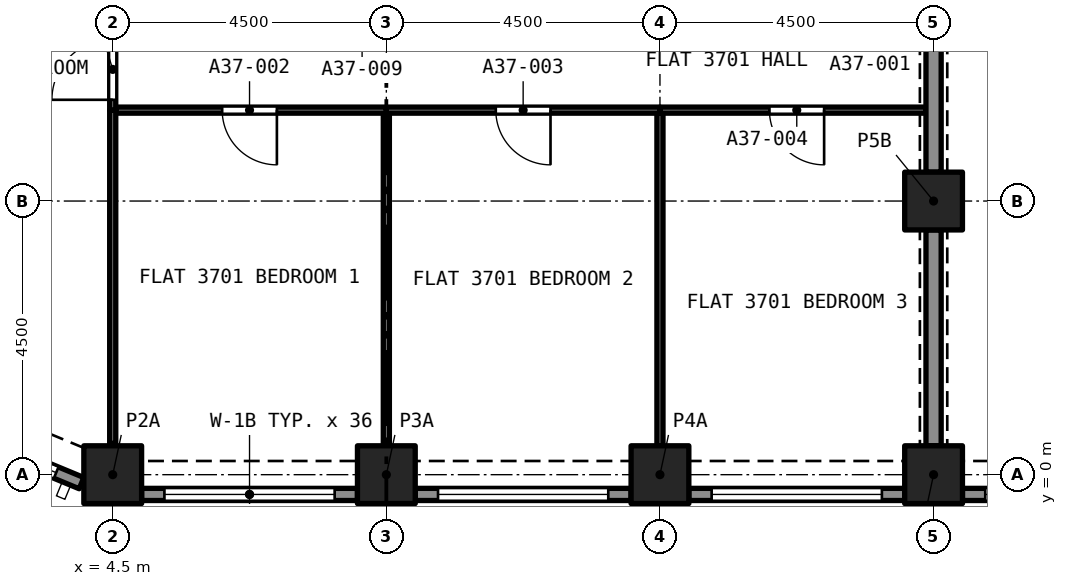
"""IFC4 building model, lengths in metres.
Left out: names, types, materials, properties, quantities, classifications, styles, units other than length and angle.
Written with IfcOpenShell. Run it as: python <this file> out.ifc"""

import sys

from ifc_helpers import new_model, si_unit, direction, frame, frame_2d, origin, origin_2d, place, context, subcontext, project, spatial, rectangle, extrude, element, fill, save


model = new_model("IFC4")
c1 = context("Model", 3, precision=1e-05, world=origin(), true_north=direction((0.0, 1.0)))
c2 = subcontext(c1, "Body", "Model", "MODEL_VIEW")
j1 = project(units=[si_unit("LENGTHUNIT", "METRE"), si_unit("PLANEANGLEUNIT", "RADIAN")], contexts=[c1])
p1 = place(None, origin())
s1 = spatial("IfcSite", under=j1, at=p1, CompositionType="ELEMENT")
p2 = place(p1, origin())
s2 = spatial("IfcBuilding", under=s1, at=p2, CompositionType="ELEMENT")
p3 = place(p2, frame((0.0, 0.0, 133.4)))
s3 = spatial("IfcBuildingStorey", under=s2, at=p3, CompositionType="ELEMENT", Elevation=133.4)
for number, where, z_axis, x_axis in (
    (1, (4.5, 0.0, 0.0), (0.0, 0.0, 1.0), (1.0, 0.0, 0.0)),
    (2, (9.0, 0.0, 0.0), (0.0, 0.0, 1.0), (1.0, 0.0, 0.0)),
    (3, (13.5, 0.0, 0.0), (0.0, 0.0, 1.0), (1.0, 0.0, 0.0)),
    (4, (18.0, 0.0, 0.0), (0.0, 0.0, 1.0), (1.0, 0.0, 0.0)),
    (5, (18.0, 4.5, 0.0), (0.0, 0.0, 1.0), (1.0, 0.0, 0.0)),
):
    element("IfcColumn", number, at=place(p3, frame(where, z_axis=z_axis, x_axis=x_axis)), inside=s3, PredefinedType="COLUMN", context=c2, shape_type="SweptSolid", body=[
        extrude(rectangle(XDim=0.95, YDim=0.95, at=origin_2d()), origin(), (0.0, 0.0, 1.0), 3.2),
    ])
p4 = place(p3, frame((3.987, -0.139, 0.0), z_axis=(0.0, 0.0, 1.0), x_axis=(-0.923880599843, 0.382680855588, 0.0)))
e6 = element("IfcWall", 6, at=p4, inside=s3, PredefinedType="SOLIDWALL", context=c2, shape_type="SweptSolid", body=[
    extrude(rectangle(XDim=2.403, YDim=0.2, at=frame_2d((1.201, 0.0))), origin(), (0.0, 0.0, 1.0), 3.2),
])
p5 = place(p4, frame((0.451, 0.0, 0.45)))
e7 = element("IfcOpeningElement", 7, at=p5, cuts=e6, PredefinedType="OPENING", context=c2, shape_type="SweptSolid", body=[
    extrude(rectangle(XDim=1.7, YDim=1.95, at=frame_2d((0.85, 0.975))), frame((0.0, 0.11, 0.0), z_axis=(0.0, -1.0, 0.0), x_axis=(1.0, 0.0, 0.0)), (0.0, 0.0, 1.0), 0.22),
])
p6 = place(p3, frame((8.525, -0.325, 0.0), z_axis=(0.0, 0.0, 1.0), x_axis=(-1.0, 0.0, 0.0)))
e8 = element("IfcWall", 8, at=p6, inside=s3, PredefinedType="SOLIDWALL", context=c2, shape_type="SweptSolid", body=[
    extrude(rectangle(XDim=3.55, YDim=0.2, at=frame_2d((1.775, 0.0))), origin(), (0.0, 0.0, 1.0), 3.2),
])
p7 = place(p6, frame((0.375, 0.0, 0.45)))
e9 = element("IfcOpeningElement", 9, at=p7, cuts=e8, PredefinedType="OPENING", context=c2, shape_type="SweptSolid", body=[
    extrude(rectangle(XDim=2.8, YDim=1.95, at=frame_2d((1.4, 0.975))), frame((0.0, 0.11, 0.0), z_axis=(0.0, -1.0, 0.0), x_axis=(1.0, 0.0, 0.0)), (0.0, 0.0, 1.0), 0.22),
])
p8 = place(p3, frame((13.025, -0.325, 0.0), z_axis=(0.0, 0.0, 1.0), x_axis=(-1.0, 0.0, 0.0)))
e10 = element("IfcWall", 10, at=p8, inside=s3, PredefinedType="SOLIDWALL", context=c2, shape_type="SweptSolid", body=[
    extrude(rectangle(XDim=3.55, YDim=0.2, at=frame_2d((1.775, 0.0))), origin(), (0.0, 0.0, 1.0), 3.2),
])
p9 = place(p8, frame((0.375, 0.0, 0.45)))
e11 = element("IfcOpeningElement", 11, at=p9, cuts=e10, PredefinedType="OPENING", context=c2, shape_type="SweptSolid", body=[
    extrude(rectangle(XDim=2.8, YDim=1.95, at=frame_2d((1.4, 0.975))), frame((0.0, 0.11, 0.0), z_axis=(0.0, -1.0, 0.0), x_axis=(1.0, 0.0, 0.0)), (0.0, 0.0, 1.0), 0.22),
])
p10 = place(p3, frame((17.525, -0.325, 0.0), z_axis=(0.0, 0.0, 1.0), x_axis=(-1.0, 0.0, 0.0)))
e12 = element("IfcWall", 12, at=p10, inside=s3, PredefinedType="SOLIDWALL", context=c2, shape_type="SweptSolid", body=[
    extrude(rectangle(XDim=3.55, YDim=0.2, at=frame_2d((1.775, 0.0))), origin(), (0.0, 0.0, 1.0), 3.2),
])
p11 = place(p10, frame((0.375, 0.0, 0.45)))
e13 = element("IfcOpeningElement", 13, at=p11, cuts=e12, PredefinedType="OPENING", context=c2, shape_type="SweptSolid", body=[
    extrude(rectangle(XDim=2.8, YDim=1.95, at=frame_2d((1.4, 0.975))), frame((0.0, 0.11, 0.0), z_axis=(0.0, -1.0, 0.0), x_axis=(1.0, 0.0, 0.0)), (0.0, 0.0, 1.0), 0.22),
])
p12 = place(p3, frame((22.025, -0.325, 0.0), z_axis=(0.0, 0.0, 1.0), x_axis=(-1.0, 0.0, 0.0)))
e14 = element("IfcWall", 14, at=p12, inside=s3, PredefinedType="SOLIDWALL", context=c2, shape_type="SweptSolid", body=[
    extrude(rectangle(XDim=3.55, YDim=0.2, at=frame_2d((1.775, 0.0))), origin(), (0.0, 0.0, 1.0), 3.2),
])
p13 = place(p12, frame((0.375, 0.0, 0.45)))
e15 = element("IfcOpeningElement", 15, at=p13, cuts=e14, PredefinedType="OPENING", context=c2, shape_type="SweptSolid", body=[
    extrude(rectangle(XDim=2.8, YDim=1.95, at=frame_2d((1.4, 0.975))), frame((0.0, 0.11, 0.0), z_axis=(0.0, -1.0, 0.0), x_axis=(1.0, 0.0, 0.0)), (0.0, 0.0, 1.0), 0.22),
])
p14 = place(p3, frame((9.0, 0.475, 0.0), z_axis=(0.0, 0.0, 1.0), x_axis=(0.0, 1.0, 0.0)))
e16 = element("IfcWall", 16, at=p14, inside=s3, PredefinedType="PARTITIONING", context=c2, shape_type="SweptSolid", body=[
    extrude(rectangle(XDim=5.47, YDim=0.1, at=frame_2d((2.735, 0.0))), origin(), (0.0, 0.0, 1.0), 2.9),
])
p15 = place(p3, frame((9.0, 5.995, 0.0), z_axis=(0.0, 0.0, 1.0), x_axis=(-1.0, 0.0, 0.0)))
e17 = element("IfcWall", 17, at=p15, inside=s3, PredefinedType="PARTITIONING", context=c2, shape_type="SweptSolid", body=[
    extrude(rectangle(XDim=4.45, YDim=0.1, at=frame_2d((2.225, 0.0))), origin(), (0.0, 0.0, 1.0), 2.9),
])
p16 = place(p15, frame((1.8, 0.0, 0.0)))
e18 = element("IfcOpeningElement", 18, at=p16, cuts=e17, PredefinedType="OPENING", context=c2, shape_type="SweptSolid", body=[
    extrude(rectangle(XDim=0.9, YDim=2.1, at=frame_2d((0.45, 1.05))), frame((0.0, 0.06, 0.0), z_axis=(0.0, -1.0, 0.0), x_axis=(1.0, 0.0, 0.0)), (0.0, 0.0, 1.0), 0.12),
])
p17 = place(p3, frame((4.5, 0.514, 0.0), z_axis=(0.0, 0.0, 1.0), x_axis=(0.0, 1.0, 0.0)))
e19 = element("IfcWall", 19, at=p17, inside=s3, PredefinedType="PARTITIONING", context=c2, shape_type="SweptSolid", body=[
    extrude(rectangle(XDim=5.481, YDim=0.1, at=frame_2d((2.74, 0.0))), origin(), (0.0, 0.0, 1.0), 2.9),
])
p18 = place(p3, frame((13.5, 0.475, 0.0), z_axis=(0.0, 0.0, 1.0), x_axis=(0.0, 1.0, 0.0)))
e20 = element("IfcWall", 20, at=p18, inside=s3, PredefinedType="PARTITIONING", context=c2, shape_type="SweptSolid", body=[
    extrude(rectangle(XDim=5.47, YDim=0.1, at=frame_2d((2.735, 0.0))), origin(), (0.0, 0.0, 1.0), 2.9),
])
p19 = place(p3, frame((13.5, 5.995, 0.0), z_axis=(0.0, 0.0, 1.0), x_axis=(-1.0, 0.0, 0.0)))
e21 = element("IfcWall", 21, at=p19, inside=s3, PredefinedType="PARTITIONING", context=c2, shape_type="SweptSolid", body=[
    extrude(rectangle(XDim=4.5, YDim=0.1, at=frame_2d((2.25, 0.0))), origin(), (0.0, 0.0, 1.0), 2.9),
])
p20 = place(p19, frame((1.8, 0.0, 0.0)))
e22 = element("IfcOpeningElement", 22, at=p20, cuts=e21, PredefinedType="OPENING", context=c2, shape_type="SweptSolid", body=[
    extrude(rectangle(XDim=0.9, YDim=2.1, at=frame_2d((0.45, 1.05))), frame((0.0, 0.06, 0.0), z_axis=(0.0, -1.0, 0.0), x_axis=(1.0, 0.0, 0.0)), (0.0, 0.0, 1.0), 0.12),
])
p21 = place(p3, frame((17.875, 5.995, 0.0), z_axis=(0.0, 0.0, 1.0), x_axis=(-1.0, 0.0, 0.0)))
e23 = element("IfcWall", 23, at=p21, inside=s3, PredefinedType="PARTITIONING", context=c2, shape_type="SweptSolid", body=[
    extrude(rectangle(XDim=4.375, YDim=0.1, at=frame_2d((2.188, 0.0))), origin(), (0.0, 0.0, 1.0), 2.9),
])
p22 = place(p21, frame((1.675, 0.0, 0.0)))
e24 = element("IfcOpeningElement", 24, at=p22, cuts=e23, PredefinedType="OPENING", context=c2, shape_type="SweptSolid", body=[
    extrude(rectangle(XDim=0.9, YDim=2.1, at=frame_2d((0.45, 1.05))), frame((0.0, 0.06, 0.0), z_axis=(0.0, -1.0, 0.0), x_axis=(1.0, 0.0, 0.0)), (0.0, 0.0, 1.0), 0.12),
])
for number, where, z_axis, x_axis in (
    (25, (18.0, 4.975, 0.0), (0.0, 0.0, 1.0), (0.0, 1.0, 0.0)),
    (26, (18.0, 0.475, 0.0), (0.0, 0.0, 1.0), (0.0, 1.0, 0.0)),
):
    element("IfcWall", number, at=place(p3, frame(where, z_axis=z_axis, x_axis=x_axis)), inside=s3, PredefinedType="PARTITIONING", context=c2, shape_type="SweptSolid", body=[
        extrude(rectangle(XDim=3.55, YDim=0.25, at=frame_2d((1.775, 0.0))), origin(), (0.0, 0.0, 1.0), 2.38),
    ])
p23 = place(p3, frame((4.5, 5.995, 0.0), z_axis=(0.0, 0.0, 1.0), x_axis=(0.0, 1.0, 0.0)))
e27 = element("IfcWall", 27, at=p23, inside=s3, PredefinedType="PARTITIONING", context=c2, shape_type="SweptSolid", body=[
    extrude(rectangle(XDim=1.34, YDim=0.1, at=frame_2d((0.67, 0.0))), origin(), (0.0, 0.0, 1.0), 2.9),
])
p24 = place(p23, frame((0.17, 0.0, 0.0)))
e28 = element("IfcOpeningElement", 28, at=p24, cuts=e27, PredefinedType="OPENING", context=c2, shape_type="SweptSolid", body=[
    extrude(rectangle(XDim=1.0, YDim=2.1, at=frame_2d((0.5, 1.05))), frame((0.0, 0.06, 0.0), z_axis=(0.0, -1.0, 0.0), x_axis=(1.0, 0.0, 0.0)), (0.0, 0.0, 1.0), 0.12),
])
p25 = place(p5, origin())
e29 = element("IfcWindow", 29, at=p25, inside=s3, PartitioningType="SINGLE_PANEL", PredefinedType="WINDOW", context=c2, shape_type="SweptSolid", body=[
    extrude(rectangle(XDim=1.7, YDim=1.95, at=frame_2d((0.85, 0.975))), frame((0.0, 0.03, 0.0), z_axis=(0.0, -1.0, 0.0), x_axis=(1.0, 0.0, 0.0)), (0.0, 0.0, 1.0), 0.06),
])
fill(e7, e29)
p26 = place(p7, origin())
e30 = element("IfcWindow", 30, at=p26, inside=s3, PartitioningType="SINGLE_PANEL", PredefinedType="WINDOW", context=c2, shape_type="SweptSolid", body=[
    extrude(rectangle(XDim=2.8, YDim=1.95, at=frame_2d((1.4, 0.975))), frame((0.0, 0.03, 0.0), z_axis=(0.0, -1.0, 0.0), x_axis=(1.0, 0.0, 0.0)), (0.0, 0.0, 1.0), 0.06),
])
fill(e9, e30)
p27 = place(p9, origin())
e31 = element("IfcWindow", 31, at=p27, inside=s3, PartitioningType="SINGLE_PANEL", PredefinedType="WINDOW", context=c2, shape_type="SweptSolid", body=[
    extrude(rectangle(XDim=2.8, YDim=1.95, at=frame_2d((1.4, 0.975))), frame((0.0, 0.03, 0.0), z_axis=(0.0, -1.0, 0.0), x_axis=(1.0, 0.0, 0.0)), (0.0, 0.0, 1.0), 0.06),
])
fill(e11, e31)
p28 = place(p11, origin())
e32 = element("IfcWindow", 32, at=p28, inside=s3, PartitioningType="SINGLE_PANEL", PredefinedType="WINDOW", context=c2, shape_type="SweptSolid", body=[
    extrude(rectangle(XDim=2.8, YDim=1.95, at=frame_2d((1.4, 0.975))), frame((0.0, 0.03, 0.0), z_axis=(0.0, -1.0, 0.0), x_axis=(1.0, 0.0, 0.0)), (0.0, 0.0, 1.0), 0.06),
])
fill(e13, e32)
p29 = place(p13, origin())
e33 = element("IfcWindow", 33, at=p29, inside=s3, PartitioningType="SINGLE_PANEL", PredefinedType="WINDOW", context=c2, shape_type="SweptSolid", body=[
    extrude(rectangle(XDim=2.8, YDim=1.95, at=frame_2d((1.4, 0.975))), frame((0.0, 0.03, 0.0), z_axis=(0.0, -1.0, 0.0), x_axis=(1.0, 0.0, 0.0)), (0.0, 0.0, 1.0), 0.06),
])
fill(e15, e33)
p30 = place(p16, origin())
e34 = element("IfcDoor", 34, at=p30, inside=s3, OperationType="SINGLE_SWING_RIGHT", PredefinedType="DOOR", context=c2, shape_type="SweptSolid", body=[
    extrude(rectangle(XDim=0.9, YDim=2.1, at=frame_2d((0.45, 1.05))), frame((0.0, 0.025, 0.0), z_axis=(0.0, -1.0, 0.0), x_axis=(1.0, 0.0, 0.0)), (0.0, 0.0, 1.0), 0.05),
])
fill(e18, e34)
p31 = place(p20, origin())
e35 = element("IfcDoor", 35, at=p31, inside=s3, OperationType="SINGLE_SWING_LEFT", PredefinedType="DOOR", context=c2, shape_type="SweptSolid", body=[
    extrude(rectangle(XDim=0.9, YDim=2.1, at=frame_2d((0.45, 1.05))), frame((0.0, 0.025, 0.0), z_axis=(0.0, -1.0, 0.0), x_axis=(1.0, 0.0, 0.0)), (0.0, 0.0, 1.0), 0.05),
])
fill(e22, e35)
p32 = place(p22, origin())
e36 = element("IfcDoor", 36, at=p32, inside=s3, OperationType="SINGLE_SWING_LEFT", PredefinedType="DOOR", context=c2, shape_type="SweptSolid", body=[
    extrude(rectangle(XDim=0.9, YDim=2.1, at=frame_2d((0.45, 1.05))), frame((0.0, 0.025, 0.0), z_axis=(0.0, -1.0, 0.0), x_axis=(1.0, 0.0, 0.0)), (0.0, 0.0, 1.0), 0.05),
])
fill(e24, e36)
p33 = place(p24, origin())
e37 = element("IfcDoor", 37, at=p33, inside=s3, OperationType="SINGLE_SWING_LEFT", PredefinedType="DOOR", context=c2, shape_type="SweptSolid", body=[
    extrude(rectangle(XDim=1.0, YDim=2.1, at=frame_2d((0.5, 1.05))), frame((0.0, 0.025, 0.0), z_axis=(0.0, -1.0, 0.0), x_axis=(1.0, 0.0, 0.0)), (0.0, 0.0, 1.0), 0.05),
])
fill(e28, e37)
save(model, sys.argv[1])
